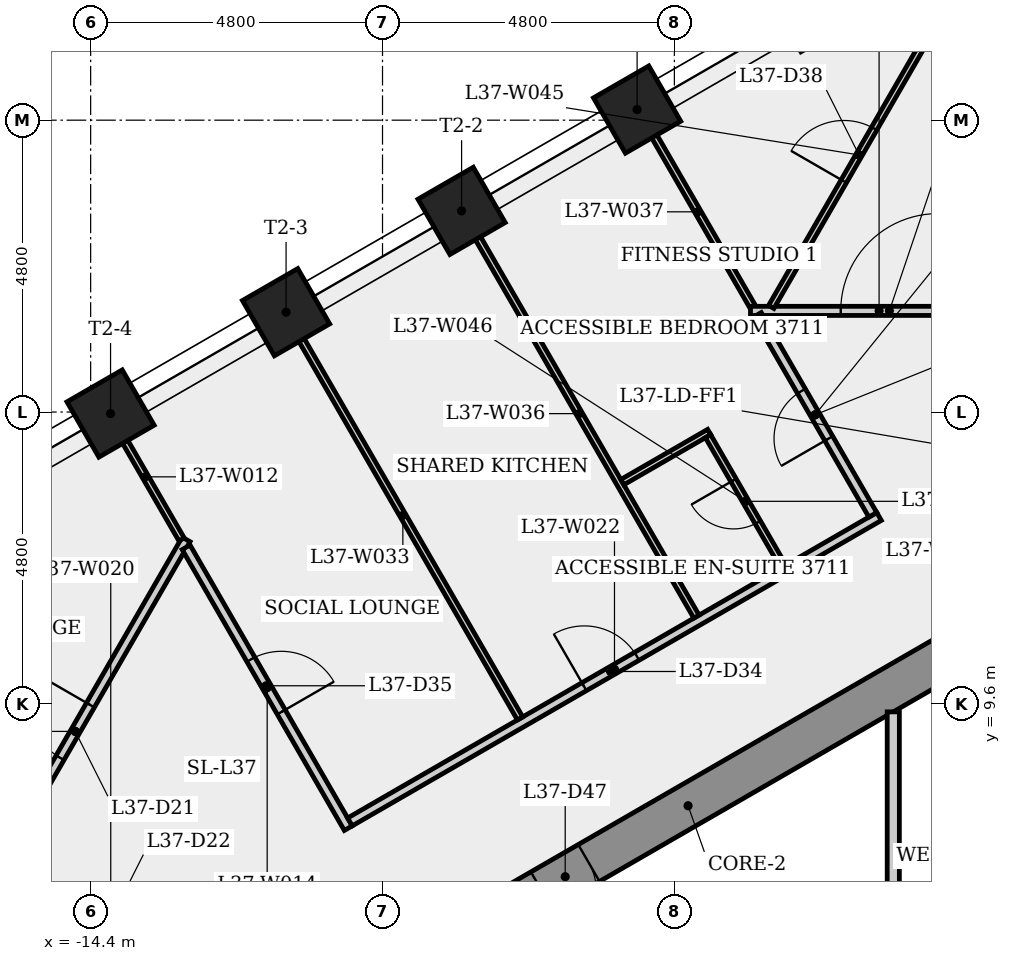
"""IFC4 building model, lengths in metres.
Left out: names, types, materials, properties, quantities, classifications, styles, units other than length and angle.
Written with IfcOpenShell. Run it as: python <this file> out.ifc"""

import sys

from ifc_helpers import new_model, si_unit, direction, frame, frame_2d, origin, origin_2d, place, context, subcontext, project, spatial, rectangle, extrude, element, fill, save


model = new_model("IFC4")
c1 = context("Model", 3, precision=1e-05, world=origin(), true_north=direction((0.0, 1.0)))
c2 = subcontext(c1, "Body", "Model", "MODEL_VIEW")
j1 = project(units=[si_unit("LENGTHUNIT", "METRE"), si_unit("PLANEANGLEUNIT", "RADIAN")], contexts=[c1])
p1 = place(None, origin())
s1 = spatial("IfcSite", under=j1, at=p1, CompositionType="ELEMENT")
p2 = place(p1, origin())
s2 = spatial("IfcBuilding", under=s1, at=p2, CompositionType="ELEMENT")
p3 = place(p2, frame((0.0, 0.0, 139.9)))
s3 = spatial("IfcBuildingStorey", under=s2, at=p3, CompositionType="ELEMENT", Elevation=139.9)
p4 = place(p3, frame((0.175, 10.667, 0.0), z_axis=(0.0, 0.0, 1.0), x_axis=(-0.866023993627, -0.500002442456, 0.0)))
e1 = element("IfcWall", 1, at=p4, inside=s3, PredefinedType="SHEAR", context=c2, shape_type="SweptSolid", body=[
    extrude(rectangle(XDim=10.97, YDim=0.7, at=frame_2d((5.485, 0.0))), origin(), (0.0, 0.0, 1.0), 4.0),
])
p5 = place(p4, frame((7.368, 0.0, 0.0)))
e2 = element("IfcOpeningElement", 2, at=p5, cuts=e1, PredefinedType="OPENING", context=c2, shape_type="SweptSolid", body=[
    extrude(rectangle(XDim=0.9, YDim=2.1, at=frame_2d((0.45, 1.05))), frame((0.0, 0.36, 0.0), z_axis=(0.0, -1.0, 0.0), x_axis=(1.0, 0.0, 0.0)), (0.0, 0.0, 1.0), 0.72),
])
for number, where, z_axis, x_axis in (
    (3, (-5.413, 19.375, 0.0), (0.0, 0.0, 1.0), (-0.5, 0.866, 0.0)),
    (4, (-8.3, 17.708, 0.0), (0.0, 0.0, 1.0), (-0.5, 0.866, 0.0)),
    (5, (-11.186, 16.042, 0.0), (0.0, 0.0, 1.0), (-0.5, 0.866, 0.0)),
    (6, (-14.073, 14.375, 0.0), (0.0, 0.0, 1.0), (-0.5, 0.866, 0.0)),
):
    element("IfcColumn", number, at=place(p3, frame(where, z_axis=z_axis, x_axis=x_axis)), inside=s3, PredefinedType="COLUMN", context=c2, shape_type="SweptSolid", body=[
        extrude(rectangle(XDim=1.05, YDim=1.05, at=origin_2d()), origin(), (0.0, 0.0, 1.0), 4.0),
    ])
p6 = place(p3, frame((-16.476, 5.989, 0.0), z_axis=(0.0, 0.0, 1.0), x_axis=(0.500002592159, 0.866023907196, 0.0)))
e7 = element("IfcWall", 7, at=p6, inside=s3, PredefinedType="PARTITIONING", context=c2, shape_type="SweptSolid", body=[
    extrude(rectangle(XDim=7.292, YDim=0.15, at=frame_2d((3.646, 0.0))), origin(), (0.0, 0.0, 1.0), 3.6),
])
p7 = place(p6, frame((3.146, 0.0, 0.0)))
e8 = element("IfcOpeningElement", 8, at=p7, cuts=e7, PredefinedType="OPENING", context=c2, shape_type="SweptSolid", body=[
    extrude(rectangle(XDim=1.0, YDim=2.1, at=frame_2d((0.5, 1.05))), frame((0.0, 0.085, 0.0), z_axis=(0.0, -1.0, 0.0), x_axis=(1.0, 0.0, 0.0)), (0.0, 0.0, 1.0), 0.17),
])
p8 = place(p3, frame((-14.094, 14.363, 0.0), z_axis=(0.0, 0.0, 1.0), x_axis=(0.500027724201, -0.866009396618, 0.0)))
e9 = element("IfcWall", 9, at=p8, inside=s3, PredefinedType="PARTITIONING", context=c2, shape_type="SweptSolid", body=[
    extrude(rectangle(XDim=2.377, YDim=0.1, at=frame_2d((1.188, 0.0))), origin(), (0.0, 0.0, 1.0), 3.6),
])
p9 = place(p3, frame((-12.83, 12.175, 0.0), z_axis=(0.0, 0.0, 1.0), x_axis=(0.49998396455, -0.866034661658, 0.0)))
e10 = element("IfcWall", 10, at=p9, inside=s3, PredefinedType="PARTITIONING", context=c2, shape_type="SweptSolid", body=[
    extrude(rectangle(XDim=5.334, YDim=0.15, at=frame_2d((2.667, 0.0))), origin(), (0.0, 0.0, 1.0), 3.6),
])
p10 = place(p9, frame((2.129, 0.0, 0.0)))
e11 = element("IfcOpeningElement", 11, at=p10, cuts=e10, PredefinedType="OPENING", context=c2, shape_type="SweptSolid", body=[
    extrude(rectangle(XDim=1.0, YDim=2.1, at=frame_2d((0.5, 1.05))), frame((0.0, 0.085, 0.0), z_axis=(0.0, -1.0, 0.0), x_axis=(1.0, 0.0, 0.0)), (0.0, 0.0, 1.0), 0.17),
])
p11 = place(p3, frame((-10.136, 7.658, 0.0), z_axis=(0.0, 0.0, 1.0), x_axis=(0.866041139319, 0.499972744263, 0.0)))
e12 = element("IfcWall", 12, at=p11, inside=s3, PredefinedType="PARTITIONING", context=c2, shape_type="SweptSolid", body=[
    extrude(rectangle(XDim=10.048, YDim=0.15, at=frame_2d((5.024, 0.0))), origin(), (0.0, 0.0, 1.0), 3.6),
])
p12 = place(p11, frame((4.449, 0.0, 0.0)))
e13 = element("IfcOpeningElement", 13, at=p12, cuts=e12, PredefinedType="OPENING", context=c2, shape_type="SweptSolid", body=[
    extrude(rectangle(XDim=1.0, YDim=2.1, at=frame_2d((0.5, 1.05))), frame((0.0, 0.085, 0.0), z_axis=(0.0, -1.0, 0.0), x_axis=(1.0, 0.0, 0.0)), (0.0, 0.0, 1.0), 0.17),
])
for number, where, z_axis, x_axis in (
    (14, (-7.338, 9.36, 0.0), (0.0, 0.0, 1.0), (-0.5, 0.866, 0.0)),
    (15, (-8.292, 17.712, 0.0), (0.0, 0.0, 1.0), (0.5, -0.866, 0.0)),
):
    element("IfcWall", number, at=place(p3, frame(where, z_axis=z_axis, x_axis=x_axis)), inside=s3, PredefinedType="PARTITIONING", context=c2, shape_type="SweptSolid", body=[
        extrude(rectangle(XDim=7.71, YDim=0.1, at=frame_2d((3.855, 0.0))), origin(), (0.0, 0.0, 1.0), 3.6),
    ])
p13 = place(p3, frame((-5.317, 19.257, 0.0), z_axis=(0.0, 0.0, 1.0), x_axis=(0.500012990229, -0.866017903742, 0.0)))
e16 = element("IfcWall", 16, at=p13, inside=s3, PredefinedType="PARTITIONING", context=c2, shape_type="SweptSolid", body=[
    extrude(rectangle(XDim=3.613, YDim=0.1, at=frame_2d((1.806, 0.0))), origin(), (0.0, 0.0, 1.0), 3.6),
])
p14 = place(p3, frame((-4.228, 14.071, 0.0), z_axis=(0.0, 0.0, 1.0), x_axis=(-0.866094390846, -0.499880491863, 0.0)))
e17 = element("IfcWall", 17, at=p14, inside=s3, PredefinedType="PARTITIONING", context=c2, shape_type="SweptSolid", body=[
    extrude(rectangle(XDim=1.649, YDim=0.1, at=frame_2d((0.825, 0.0))), origin(), (0.0, 0.0, 1.0), 3.6),
])
p15 = place(p3, frame((-3.548, 16.063, 0.0), z_axis=(0.0, 0.0, 1.0), x_axis=(1.0, 0.0, 0.0)))
e18 = element("IfcWall", 18, at=p15, inside=s3, PredefinedType="PARTITIONING", context=c2, shape_type="SweptSolid", body=[
    extrude(rectangle(XDim=4.23, YDim=0.15, at=frame_2d((2.115, 0.0))), origin(), (0.0, 0.0, 1.0), 3.6),
])
p16 = place(p15, frame((1.484, 0.0, 0.0)))
e19 = element("IfcOpeningElement", 19, at=p16, cuts=e18, PredefinedType="OPENING", context=c2, shape_type="SweptSolid", body=[
    extrude(rectangle(XDim=1.6, YDim=2.1, at=frame_2d((0.8, 1.05))), frame((0.0, 0.085, 0.0), z_axis=(0.0, -1.0, 0.0), x_axis=(1.0, 0.0, 0.0)), (0.0, 0.0, 1.0), 0.17),
])
p17 = place(p3, frame((-3.207, 16.128, 0.0), z_axis=(0.0, 0.0, 1.0), x_axis=(0.499964049572, 0.866046158779, 0.0)))
e20 = element("IfcWall", 20, at=p17, inside=s3, PredefinedType="PARTITIONING", context=c2, shape_type="SweptSolid", body=[
    extrude(rectangle(XDim=5.773, YDim=0.1, at=frame_2d((2.887, 0.0))), origin(), (0.0, 0.0, 1.0), 3.6),
])
p18 = place(p17, frame((2.387, 0.0, 0.0)))
e21 = element("IfcOpeningElement", 21, at=p18, cuts=e20, PredefinedType="OPENING", context=c2, shape_type="SweptSolid", body=[
    extrude(rectangle(XDim=1.0, YDim=2.1, at=frame_2d((0.5, 1.05))), frame((0.0, 0.06, 0.0), z_axis=(0.0, -1.0, 0.0), x_axis=(1.0, 0.0, 0.0)), (0.0, 0.0, 1.0), 0.12),
])
p19 = place(p3, frame((-3.009, 11.859, 0.0), z_axis=(0.0, 0.0, 1.0), x_axis=(-0.500032699561, 0.866006523861, 0.0)))
e22 = element("IfcWall", 22, at=p19, inside=s3, PredefinedType="PARTITIONING", context=c2, shape_type="SweptSolid", body=[
    extrude(rectangle(XDim=2.475, YDim=0.1, at=frame_2d((1.237, 0.0))), origin(), (0.0, 0.0, 1.0), 3.6),
])
p20 = place(p19, frame((0.837, 0.0, 0.0)))
e23 = element("IfcOpeningElement", 23, at=p20, cuts=e22, PredefinedType="OPENING", context=c2, shape_type="SweptSolid", body=[
    extrude(rectangle(XDim=0.8, YDim=2.1, at=frame_2d((0.4, 1.05))), frame((0.0, 0.06, 0.0), z_axis=(0.0, -1.0, 0.0), x_axis=(1.0, 0.0, 0.0)), (0.0, 0.0, 1.0), 0.12),
])
p21 = place(p3, frame((-1.537, 12.709, 0.0), z_axis=(0.0, 0.0, 1.0), x_axis=(-0.500045181452, 0.865999316689, 0.0)))
e24 = element("IfcWall", 24, at=p21, inside=s3, PredefinedType="PARTITIONING", context=c2, shape_type="SweptSolid", body=[
    extrude(rectangle(XDim=3.798, YDim=0.15, at=frame_2d((1.899, 0.0))), origin(), (0.0, 0.0, 1.0), 3.6),
])
p22 = place(p21, frame((1.449, 0.0, 0.0)))
e25 = element("IfcOpeningElement", 25, at=p22, cuts=e24, PredefinedType="OPENING", context=c2, shape_type="SweptSolid", body=[
    extrude(rectangle(XDim=0.9, YDim=2.1, at=frame_2d((0.45, 1.05))), frame((0.0, 0.085, 0.0), z_axis=(0.0, -1.0, 0.0), x_axis=(1.0, 0.0, 0.0)), (0.0, 0.0, 1.0), 0.17),
])
p23 = place(p3, frame((-1.2, 9.469, 0.0), z_axis=(0.0, 0.0, 1.0), x_axis=(0.0, -1.0, 0.0)))
e26 = element("IfcWall", 26, at=p23, inside=s3, PredefinedType="PARTITIONING", context=c2, shape_type="SweptSolid", body=[
    extrude(rectangle(XDim=4.194, YDim=0.2, at=frame_2d((2.097, 0.0))), origin(), (0.0, 0.0, 1.0), 3.6),
])
p24 = place(p7, origin())
e27 = element("IfcDoor", 27, at=p24, inside=s3, OperationType="SINGLE_SWING_RIGHT", PredefinedType="DOOR", context=c2, shape_type="SweptSolid", body=[
    extrude(rectangle(XDim=1.0, YDim=2.1, at=frame_2d((0.5, 1.05))), frame((0.0, 0.025, 0.0), z_axis=(0.0, -1.0, 0.0), x_axis=(1.0, 0.0, 0.0)), (0.0, 0.0, 1.0), 0.05),
])
fill(e8, e27)
p25 = place(p22, origin())
e28 = element("IfcDoor", 28, at=p25, inside=s3, OperationType="SINGLE_SWING_LEFT", PredefinedType="DOOR", context=c2, shape_type="SweptSolid", body=[
    extrude(rectangle(XDim=0.9, YDim=2.1, at=frame_2d((0.45, 1.05))), frame((0.0, 0.025, 0.0), z_axis=(0.0, -1.0, 0.0), x_axis=(1.0, 0.0, 0.0)), (0.0, 0.0, 1.0), 0.05),
])
fill(e25, e28)
p26 = place(p20, origin())
e29 = element("IfcDoor", 29, at=p26, inside=s3, OperationType="SINGLE_SWING_RIGHT", PredefinedType="DOOR", context=c2, shape_type="SweptSolid", body=[
    extrude(rectangle(XDim=0.8, YDim=2.1, at=frame_2d((0.4, 1.05))), frame((0.0, 0.025, 0.0), z_axis=(0.0, -1.0, 0.0), x_axis=(1.0, 0.0, 0.0)), (0.0, 0.0, 1.0), 0.05),
])
fill(e23, e29)
p27 = place(p12, origin())
e30 = element("IfcDoor", 30, at=p27, inside=s3, OperationType="SINGLE_SWING_LEFT", PredefinedType="DOOR", context=c2, shape_type="SweptSolid", body=[
    extrude(rectangle(XDim=1.0, YDim=2.1, at=frame_2d((0.5, 1.05))), frame((0.0, 0.025, 0.0), z_axis=(0.0, -1.0, 0.0), x_axis=(1.0, 0.0, 0.0)), (0.0, 0.0, 1.0), 0.05),
])
fill(e13, e30)
p28 = place(p10, origin())
e31 = element("IfcDoor", 31, at=p28, inside=s3, OperationType="SINGLE_SWING_RIGHT", PredefinedType="DOOR", context=c2, shape_type="SweptSolid", body=[
    extrude(rectangle(XDim=1.0, YDim=2.1, at=frame_2d((0.5, 1.05))), frame((0.0, 0.025, 0.0), z_axis=(0.0, -1.0, 0.0), x_axis=(1.0, 0.0, 0.0)), (0.0, 0.0, 1.0), 0.05),
])
fill(e11, e31)
p29 = place(p16, origin())
e32 = element("IfcDoor", 32, at=p29, inside=s3, OperationType="SINGLE_SWING_RIGHT", PredefinedType="DOOR", context=c2, shape_type="SweptSolid", body=[
    extrude(rectangle(XDim=1.6, YDim=2.1, at=frame_2d((0.8, 1.05))), frame((0.0, 0.025, 0.0), z_axis=(0.0, -1.0, 0.0), x_axis=(1.0, 0.0, 0.0)), (0.0, 0.0, 1.0), 0.05),
])
fill(e19, e32)
p30 = place(p18, origin())
e33 = element("IfcDoor", 33, at=p30, inside=s3, OperationType="SINGLE_SWING_LEFT", PredefinedType="DOOR", context=c2, shape_type="SweptSolid", body=[
    extrude(rectangle(XDim=1.0, YDim=2.1, at=frame_2d((0.5, 1.05))), frame((0.0, 0.025, 0.0), z_axis=(0.0, -1.0, 0.0), x_axis=(1.0, 0.0, 0.0)), (0.0, 0.0, 1.0), 0.05),
])
fill(e21, e33)
p31 = place(p5, origin())
e34 = element("IfcDoor", 34, at=p31, inside=s3, OperationType="SINGLE_SWING_RIGHT", PredefinedType="DOOR", context=c2, shape_type="SweptSolid", body=[
    extrude(rectangle(XDim=0.9, YDim=2.1, at=frame_2d((0.45, 1.05))), frame((0.0, 0.025, 0.0), z_axis=(0.0, -1.0, 0.0), x_axis=(1.0, 0.0, 0.0)), (0.0, 0.0, 1.0), 0.05),
])
fill(e2, e34)
save(model, sys.argv[1])
